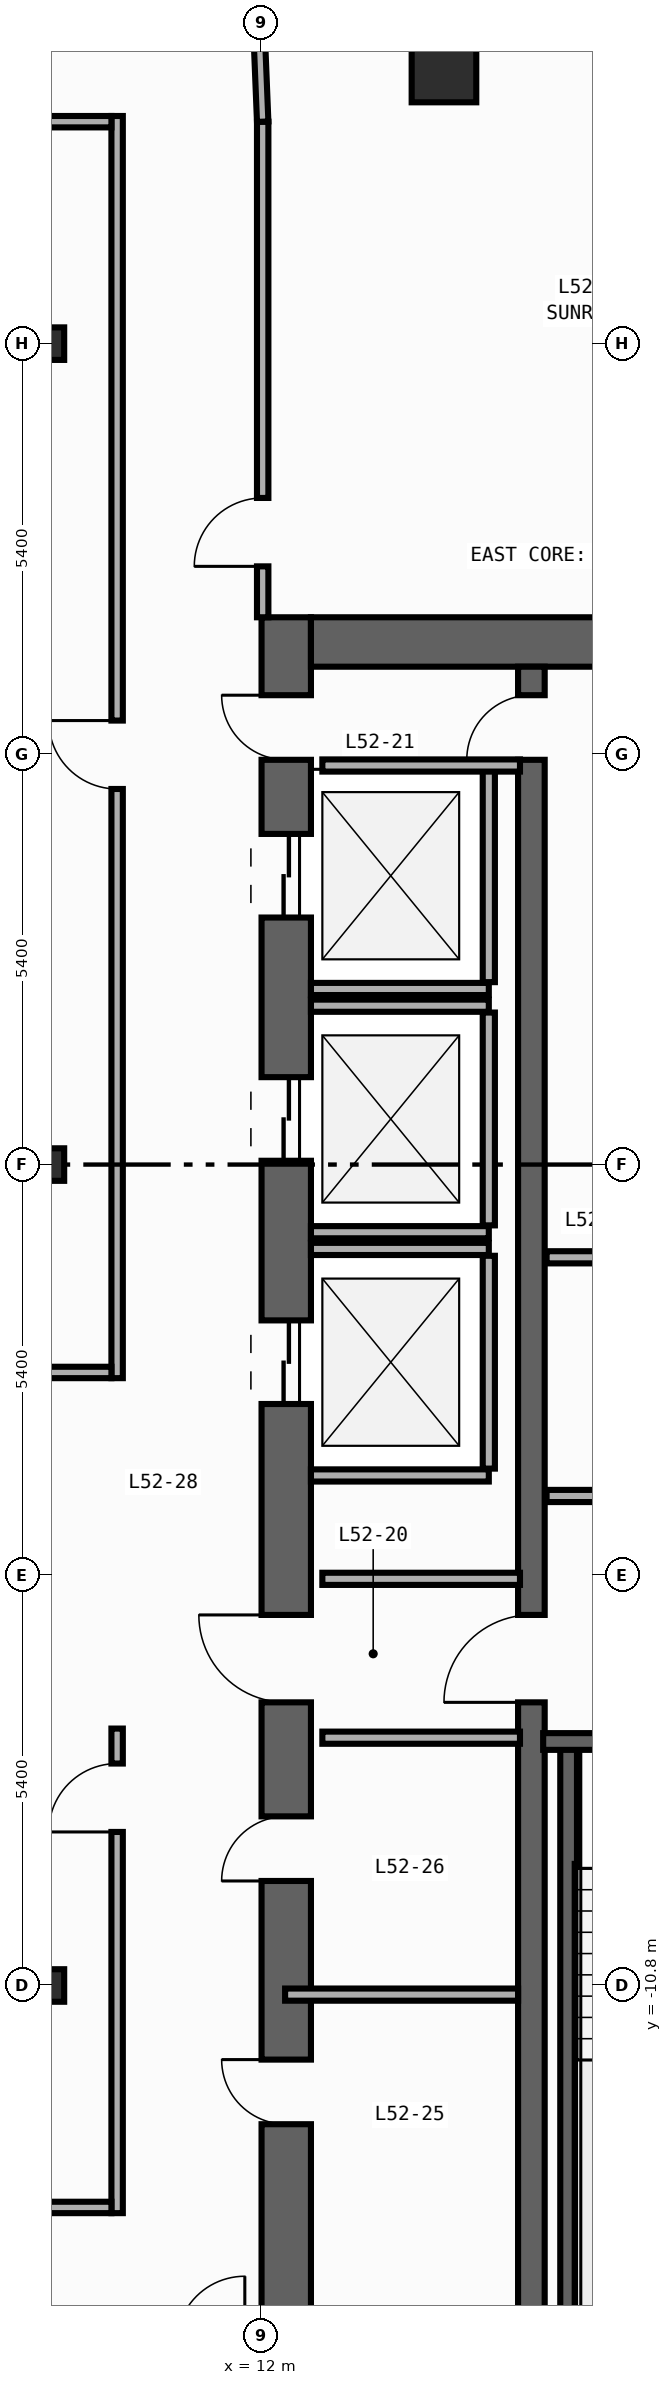
"""IFC4 building model, lengths in metres.
Left out: names, types, materials, properties, quantities, classifications, styles, units other than length and angle.
Written with IfcOpenShell. Run it as: python <this file> out.ifc"""

import sys

from ifc_helpers import new_model, si_unit, direction, frame, frame_2d, origin, origin_2d, place, context, subcontext, project, spatial, rectangle, i_section, extrude, element, fill, save


model = new_model("IFC4")
c1 = context("Model", 3, precision=1e-05, world=origin(), true_north=direction((0.0, 1.0)))
c2 = subcontext(c1, "Body", "Model", "MODEL_VIEW")
j1 = project(units=[si_unit("LENGTHUNIT", "METRE"), si_unit("PLANEANGLEUNIT", "RADIAN")], contexts=[c1])
p1 = place(None, origin())
s1 = spatial("IfcSite", under=j1, at=p1, CompositionType="ELEMENT")
p2 = place(p1, origin())
s2 = spatial("IfcBuilding", under=s1, at=p2, CompositionType="ELEMENT")
p3 = place(p2, frame((0.0, 0.0, 226.0)))
s3 = spatial("IfcBuildingStorey", under=s2, at=p3, CompositionType="ELEMENT", Elevation=226.0)
p4 = place(p3, frame((12.325, -19.8, 0.0), z_axis=(0.0, 0.0, 1.0), x_axis=(0.0, 1.0, 0.0)))
e1 = element("IfcWall", 1, at=p4, inside=s3, PredefinedType="SHEAR", context=c2, shape_type="SweptSolid", body=[
    extrude(rectangle(XDim=27.0, YDim=0.65, at=frame_2d((13.5, 0.0))), origin(), (0.0, 0.0, 1.0), 3.34),
])
p5 = place(p4, frame((23.05, 0.0, 0.0)))
e2 = element("IfcOpeningElement", 2, at=p5, cuts=e1, PredefinedType="OPENING", context=c2, shape_type="SweptSolid", body=[
    extrude(rectangle(XDim=1.1, YDim=2.2, at=frame_2d((0.55, 1.1))), frame((0.0, 0.335, 0.0), z_axis=(0.0, -1.0, 0.0), x_axis=(1.0, 0.0, 0.0)), (0.0, 0.0, 1.0), 0.67),
])
p6 = place(p4, frame((19.85, 0.0, 0.0)))
e3 = element("IfcOpeningElement", 3, at=p6, cuts=e1, PredefinedType="OPENING", context=c2, shape_type="SweptSolid", body=[
    extrude(rectangle(XDim=1.1, YDim=2.2, at=frame_2d((0.55, 1.1))), frame((0.0, 0.335, 0.0), z_axis=(0.0, -1.0, 0.0), x_axis=(1.0, 0.0, 0.0)), (0.0, 0.0, 1.0), 0.67),
])
p7 = place(p4, frame((16.65, 0.0, 0.0)))
e4 = element("IfcOpeningElement", 4, at=p7, cuts=e1, PredefinedType="OPENING", context=c2, shape_type="SweptSolid", body=[
    extrude(rectangle(XDim=1.1, YDim=2.2, at=frame_2d((0.55, 1.1))), frame((0.0, 0.335, 0.0), z_axis=(0.0, -1.0, 0.0), x_axis=(1.0, 0.0, 0.0)), (0.0, 0.0, 1.0), 0.67),
])
p8 = place(p4, frame((7.175, 0.0, 0.0)))
e5 = element("IfcOpeningElement", 5, at=p8, cuts=e1, PredefinedType="OPENING", context=c2, shape_type="SweptSolid", body=[
    extrude(rectangle(XDim=0.85, YDim=2.1, at=frame_2d((0.425, 1.05))), frame((0.0, 0.335, 0.0), z_axis=(0.0, -1.0, 0.0), x_axis=(1.0, 0.0, 0.0)), (0.0, 0.0, 1.0), 0.67),
])
p9 = place(p4, frame((10.375, 0.0, 0.0)))
e6 = element("IfcOpeningElement", 6, at=p9, cuts=e1, PredefinedType="OPENING", context=c2, shape_type="SweptSolid", body=[
    extrude(rectangle(XDim=0.85, YDim=2.1, at=frame_2d((0.425, 1.05))), frame((0.0, 0.335, 0.0), z_axis=(0.0, -1.0, 0.0), x_axis=(1.0, 0.0, 0.0)), (0.0, 0.0, 1.0), 0.67),
])
p10 = place(p4, frame((12.725, 0.0, 0.0)))
e7 = element("IfcOpeningElement", 7, at=p10, cuts=e1, PredefinedType="OPENING", context=c2, shape_type="SweptSolid", body=[
    extrude(rectangle(XDim=1.15, YDim=2.2, at=frame_2d((0.575, 1.1))), frame((0.0, 0.335, 0.0), z_axis=(0.0, -1.0, 0.0), x_axis=(1.0, 0.0, 0.0)), (0.0, 0.0, 1.0), 0.67),
])
p11 = place(p4, frame((25.125, 0.0, 0.0)))
e8 = element("IfcOpeningElement", 8, at=p11, cuts=e1, PredefinedType="OPENING", context=c2, shape_type="SweptSolid", body=[
    extrude(rectangle(XDim=0.85, YDim=2.1, at=frame_2d((0.425, 1.05))), frame((0.0, 0.335, 0.0), z_axis=(0.0, -1.0, 0.0), x_axis=(1.0, 0.0, 0.0)), (0.0, 0.0, 1.0), 0.67),
])
p12 = place(p3, frame((12.65, 6.875, 0.0), z_axis=(0.0, 0.0, 1.0), x_axis=(1.0, 0.0, 0.0)))
e9 = element("IfcWall", 9, at=p12, inside=s3, PredefinedType="SHEAR", context=c2, shape_type="SweptSolid", body=[
    extrude(rectangle(XDim=7.1, YDim=0.65, at=frame_2d((3.55, 0.0))), origin(), (0.0, 0.0, 1.0), 3.34),
])
p13 = place(p3, frame((15.55, -19.15, 0.0), z_axis=(0.0, 0.0, 1.0), x_axis=(0.0, 1.0, 0.0)))
e10 = element("IfcWall", 10, at=p13, inside=s3, PredefinedType="SHEAR", context=c2, shape_type="SweptSolid", body=[
    extrude(rectangle(XDim=25.7, YDim=0.35, at=frame_2d((12.85, 0.0))), origin(), (0.0, 0.0, 1.0), 3.34),
])
p14 = place(p13, frame((12.075, 0.0, 0.0)))
e11 = element("IfcOpeningElement", 11, at=p14, cuts=e10, PredefinedType="OPENING", context=c2, shape_type="SweptSolid", body=[
    extrude(rectangle(XDim=1.15, YDim=2.2, at=frame_2d((0.575, 1.1))), frame((0.0, 0.185, 0.0), z_axis=(0.0, -1.0, 0.0), x_axis=(1.0, 0.0, 0.0)), (0.0, 0.0, 1.0), 0.37),
])
p15 = place(p13, frame((24.475, 0.0, 0.0)))
e12 = element("IfcOpeningElement", 12, at=p15, cuts=e10, PredefinedType="OPENING", context=c2, shape_type="SweptSolid", body=[
    extrude(rectangle(XDim=0.85, YDim=2.1, at=frame_2d((0.425, 1.05))), frame((0.0, 0.185, 0.0), z_axis=(0.0, -1.0, 0.0), x_axis=(1.0, 0.0, 0.0)), (0.0, 0.0, 1.0), 0.37),
])
p16 = place(p3, frame((16.04, -19.01, 0.0), z_axis=(0.0, 0.0, 1.0), x_axis=(0.0, 1.0, 0.0)))
e13 = element("IfcWall", 13, at=p16, inside=s3, PredefinedType="SHEAR", context=c2, shape_type="SweptSolid", body=[
    extrude(rectangle(XDim=11.42, YDim=0.22, at=frame_2d((5.71, 0.0))), origin(), (0.0, 0.0, 1.0), 3.34),
])
p17 = place(p3, frame((19.77, -7.59, 0.0), z_axis=(0.0, 0.0, 1.0), x_axis=(-1.0, 0.0, 0.0)))
e14 = element("IfcWall", 14, at=p17, inside=s3, PredefinedType="SHEAR", context=c2, shape_type="SweptSolid", body=[
    extrude(rectangle(XDim=4.065, YDim=0.22, at=frame_2d((2.032, 0.0))), origin(), (0.0, 0.0, 1.0), 3.34),
])
p18 = place(p17, frame((1.08, 0.0, 0.0)))
e15 = element("IfcOpeningElement", 15, at=p18, cuts=e14, PredefinedType="OPENING", context=c2, shape_type="SweptSolid", body=[
    extrude(rectangle(XDim=1.1, YDim=2.2, at=frame_2d((0.55, 1.1))), frame((0.0, 0.12, 0.0), z_axis=(0.0, -1.0, 0.0), x_axis=(1.0, 0.0, 0.0)), (0.0, 0.0, 1.0), 0.24),
])
for number, where, z_axis, x_axis in (
    (16, (9.2, -10.8, 0.0), (0.0, 0.0, 1.0), (1.0, 0.0, 0.0)),
    (17, (9.2, 0.0, 0.0), (0.0, 0.0, 1.0), (1.0, 0.0, 0.0)),
    (18, (9.2, 10.8, 0.0), (0.0, 0.0, 1.0), (1.0, 0.0, 0.0)),
):
    element("IfcColumn", number, at=place(p3, frame(where, z_axis=z_axis, x_axis=x_axis)), inside=s3, PredefinedType="COLUMN", context=c2, shape_type="SweptSolid", body=[
        extrude(i_section(OverallWidth=0.407, OverallDepth=0.428, WebThickness=0.02, FlangeThickness=0.035, FilletRadius=0.022, at=origin_2d()), origin(), (0.0, 0.0, 1.0), 3.6),
    ])
p19 = place(p3, frame((14.4, 14.4, 0.0), z_axis=(0.0, 0.0, 1.0), x_axis=(1.0, 0.0, 0.0)))
e19 = element("IfcColumn", 19, at=p19, inside=s3, PredefinedType="COLUMN", context=c2, shape_type="SweptSolid", body=[
    extrude(rectangle(XDim=0.85, YDim=0.85, at=origin_2d()), origin(), (0.0, 0.0, 1.0), 3.6),
])
p20 = place(p3, frame((12.65, 2.31, 0.0), z_axis=(0.0, 0.0, 1.0), x_axis=(1.0, 0.0, 0.0)))
e20 = element("IfcWall", 20, at=p20, inside=s3, PredefinedType="STANDARD", context=c2, shape_type="SweptSolid", body=[
    extrude(rectangle(XDim=2.34, YDim=0.16, at=frame_2d((1.17, 0.0))), origin(), (0.0, 0.0, 1.0), 3.34),
])
p21 = place(p3, frame((14.99, 2.4, 0.0), z_axis=(0.0, 0.0, 1.0), x_axis=(0.0, 1.0, 0.0)))
e21 = element("IfcWall", 21, at=p21, inside=s3, PredefinedType="STANDARD", context=c2, shape_type="SweptSolid", body=[
    extrude(rectangle(XDim=2.8, YDim=0.16, at=frame_2d((1.4, 0.0))), origin(), (0.0, 0.0, 1.0), 3.34),
])
for number, where, z_axis, x_axis in (
    (22, (12.65, -0.89, 0.0), (0.0, 0.0, 1.0), (1.0, 0.0, 0.0)),
    (23, (12.65, 2.09, 0.0), (0.0, 0.0, 1.0), (1.0, 0.0, 0.0)),
):
    element("IfcWall", number, at=place(p3, frame(where, z_axis=z_axis, x_axis=x_axis)), inside=s3, PredefinedType="STANDARD", context=c2, shape_type="SweptSolid", body=[
        extrude(rectangle(XDim=2.34, YDim=0.16, at=frame_2d((1.17, 0.0))), origin(), (0.0, 0.0, 1.0), 3.34),
    ])
p22 = place(p3, frame((14.99, -0.8, 0.0), z_axis=(0.0, 0.0, 1.0), x_axis=(0.0, 1.0, 0.0)))
e24 = element("IfcWall", 24, at=p22, inside=s3, PredefinedType="STANDARD", context=c2, shape_type="SweptSolid", body=[
    extrude(rectangle(XDim=2.8, YDim=0.16, at=frame_2d((1.4, 0.0))), origin(), (0.0, 0.0, 1.0), 3.34),
])
for number, where, z_axis, x_axis in (
    (25, (12.65, -4.09, 0.0), (0.0, 0.0, 1.0), (1.0, 0.0, 0.0)),
    (26, (12.65, -1.11, 0.0), (0.0, 0.0, 1.0), (1.0, 0.0, 0.0)),
):
    element("IfcWall", number, at=place(p3, frame(where, z_axis=z_axis, x_axis=x_axis)), inside=s3, PredefinedType="STANDARD", context=c2, shape_type="SweptSolid", body=[
        extrude(rectangle(XDim=2.34, YDim=0.16, at=frame_2d((1.17, 0.0))), origin(), (0.0, 0.0, 1.0), 3.34),
    ])
p23 = place(p3, frame((14.99, -4.0, 0.0), z_axis=(0.0, 0.0, 1.0), x_axis=(0.0, 1.0, 0.0)))
e27 = element("IfcWall", 27, at=p23, inside=s3, PredefinedType="STANDARD", context=c2, shape_type="SweptSolid", body=[
    extrude(rectangle(XDim=2.8, YDim=0.16, at=frame_2d((1.4, 0.0))), origin(), (0.0, 0.0, 1.0), 3.34),
])
p24 = place(p3, frame((15.75, -4.36, 0.0), z_axis=(0.0, 0.0, 1.0), x_axis=(1.0, 0.0, 0.0)))
e28 = element("IfcWall", 28, at=p24, inside=s3, PredefinedType="STANDARD", context=c2, shape_type="SweptSolid", body=[
    extrude(rectangle(XDim=3.8, YDim=0.16, at=frame_2d((1.9, 0.0))), origin(), (0.0, 0.0, 1.0), 3.34),
])
p25 = place(p24, frame((1.47, 0.0, 0.0)))
e29 = element("IfcOpeningElement", 29, at=p25, cuts=e28, PredefinedType="OPENING", context=c2, shape_type="SweptSolid", body=[
    extrude(rectangle(XDim=1.15, YDim=2.2, at=frame_2d((0.575, 1.1))), frame((0.0, 0.09, 0.0), z_axis=(0.0, -1.0, 0.0), x_axis=(1.0, 0.0, 0.0)), (0.0, 0.0, 1.0), 0.18),
])
p26 = place(p3, frame((15.75, -1.22, 0.0), z_axis=(0.0, 0.0, 1.0), x_axis=(1.0, 0.0, 0.0)))
e30 = element("IfcWall", 30, at=p26, inside=s3, PredefinedType="STANDARD", context=c2, shape_type="SweptSolid", body=[
    extrude(rectangle(XDim=3.8, YDim=0.16, at=frame_2d((1.9, 0.0))), origin(), (0.0, 0.0, 1.0), 3.34),
])
for number, where, z_axis, x_axis in (
    (31, (12.8, -5.45, 0.0), (0.0, 0.0, 1.0), (1.0, 0.0, 0.0)),
    (32, (12.8, -7.54, 0.0), (0.0, 0.0, 1.0), (1.0, 0.0, 0.0)),
    (33, (12.8, 5.25, 0.0), (0.0, 0.0, 1.0), (1.0, 0.0, 0.0)),
):
    element("IfcWall", number, at=place(p3, frame(where, z_axis=z_axis, x_axis=x_axis)), inside=s3, PredefinedType="STANDARD", context=c2, shape_type="SweptSolid", body=[
        extrude(rectangle(XDim=2.6, YDim=0.16, at=frame_2d((1.3, 0.0))), origin(), (0.0, 0.0, 1.0), 3.34),
    ])
p27 = place(p3, frame((12.31, -10.92, 0.0), z_axis=(0.0, 0.0, 1.0), x_axis=(1.0, 0.0, 0.0)))
e34 = element("IfcWall", 34, at=p27, inside=s3, PredefinedType="PARTITIONING", context=c2, shape_type="SweptSolid", body=[
    extrude(rectangle(XDim=3.065, YDim=0.16, at=frame_2d((1.532, 0.0))), origin(), (0.0, 0.0, 1.0), 2.44),
])
p28 = place(p3, frame((12.015, 7.2, 0.0), z_axis=(0.0, 0.0, 1.0), x_axis=(0.0, 1.0, 0.0)))
e35 = element("IfcWall", 35, at=p28, inside=s3, PredefinedType="PARTITIONING", context=c2, shape_type="SweptSolid", body=[
    extrude(rectangle(XDim=6.52, YDim=0.15, at=frame_2d((3.26, 0.0))), origin(), (0.0, 0.0, 1.0), 3.34),
])
p29 = place(p28, frame((0.67, 0.0, 0.0)))
e36 = element("IfcOpeningElement", 36, at=p29, cuts=e35, PredefinedType="OPENING", context=c2, shape_type="SweptSolid", body=[
    extrude(rectangle(XDim=0.9, YDim=2.15, at=frame_2d((0.45, 1.075))), frame((0.0, 0.085, 0.0), z_axis=(0.0, -1.0, 0.0), x_axis=(1.0, 0.0, 0.0)), (0.0, 0.0, 1.0), 0.17),
])
p30 = place(p3, frame((10.1, -2.81, 0.0), z_axis=(0.0, 0.0, 1.0), x_axis=(0.0, 1.0, 0.0)))
e37 = element("IfcWall", 37, at=p30, inside=s3, PredefinedType="PARTITIONING", context=c2, shape_type="SweptSolid", body=[
    extrude(rectangle(XDim=16.605, YDim=0.15, at=frame_2d((8.302, 0.0))), origin(), (0.0, 0.0, 1.0), 3.34),
])
p31 = place(p30, frame((7.751, 0.0, 0.0)))
e38 = element("IfcOpeningElement", 38, at=p31, cuts=e37, PredefinedType="OPENING", context=c2, shape_type="SweptSolid", body=[
    extrude(rectangle(XDim=0.9, YDim=2.15, at=frame_2d((0.45, 1.075))), frame((0.0, 0.085, 0.0), z_axis=(0.0, -1.0, 0.0), x_axis=(1.0, 0.0, 0.0)), (0.0, 0.0, 1.0), 0.17),
])
p32 = place(p3, frame((10.1, -13.795, 0.0), z_axis=(0.0, 0.0, 1.0), x_axis=(0.0, 1.0, 0.0)))
e39 = element("IfcWall", 39, at=p32, inside=s3, PredefinedType="PARTITIONING", context=c2, shape_type="SweptSolid", body=[
    extrude(rectangle(XDim=6.375, YDim=0.15, at=frame_2d((3.188, 0.0))), origin(), (0.0, 0.0, 1.0), 3.34),
])
p33 = place(p32, frame((5.015, 0.0, 0.0)))
e40 = element("IfcOpeningElement", 40, at=p33, cuts=e39, PredefinedType="OPENING", context=c2, shape_type="SweptSolid", body=[
    extrude(rectangle(XDim=0.9, YDim=2.15, at=frame_2d((0.45, 1.075))), frame((0.0, 0.085, 0.0), z_axis=(0.0, -1.0, 0.0), x_axis=(1.0, 0.0, 0.0)), (0.0, 0.0, 1.0), 0.17),
])
p34 = place(p3, frame((-3.01, -2.735, 0.0), z_axis=(0.0, 0.0, 1.0), x_axis=(1.0, 0.0, 0.0)))
e41 = element("IfcWall", 41, at=p34, inside=s3, PredefinedType="PARTITIONING", context=c2, shape_type="SweptSolid", body=[
    extrude(rectangle(XDim=13.035, YDim=0.15, at=frame_2d((6.518, 0.0))), origin(), (0.0, 0.0, 1.0), 3.34),
])
p35 = place(p34, frame((2.463, 0.0, 0.0)))
e42 = element("IfcOpeningElement", 42, at=p35, cuts=e41, PredefinedType="OPENING", context=c2, shape_type="SweptSolid", body=[
    extrude(rectangle(XDim=0.9, YDim=2.15, at=frame_2d((0.45, 1.075))), frame((0.0, 0.085, 0.0), z_axis=(0.0, -1.0, 0.0), x_axis=(1.0, 0.0, 0.0)), (0.0, 0.0, 1.0), 0.17),
])
p36 = place(p3, frame((12.015, 13.72, 0.0), z_axis=(0.0, 0.0, 1.0), x_axis=(-0.040046877756, 0.99919780203, 0.0)))
e43 = element("IfcWall", 43, at=p36, inside=s3, PredefinedType="PARTITIONING", context=c2, shape_type="SweptSolid", body=[
    extrude(rectangle(XDim=1.731, YDim=0.15, at=frame_2d((0.866, 0.0))), origin(), (0.0, 0.0, 1.0), 3.34),
])
p37 = place(p3, frame((-2.86, 13.72, 0.0), z_axis=(0.0, 0.0, 1.0), x_axis=(1.0, 0.0, 0.0)))
e44 = element("IfcWall", 44, at=p37, inside=s3, PredefinedType="PARTITIONING", context=c2, shape_type="SweptSolid", body=[
    extrude(rectangle(XDim=12.885, YDim=0.15, at=frame_2d((6.442, 0.0))), origin(), (0.0, 0.0, 1.0), 3.34),
])
p38 = place(p37, frame((4.685, 0.0, 0.0)))
e45 = element("IfcOpeningElement", 45, at=p38, cuts=e44, PredefinedType="OPENING", context=c2, shape_type="SweptSolid", body=[
    extrude(rectangle(XDim=0.9, YDim=2.15, at=frame_2d((0.45, 1.075))), frame((0.0, 0.085, 0.0), z_axis=(0.0, -1.0, 0.0), x_axis=(1.0, 0.0, 0.0)), (0.0, 0.0, 1.0), 0.17),
])
p39 = place(p3, frame((-3.03, -13.72, 0.0), z_axis=(0.0, 0.0, 1.0), x_axis=(1.0, 0.0, 0.0)))
e46 = element("IfcWall", 46, at=p39, inside=s3, PredefinedType="PARTITIONING", context=c2, shape_type="SweptSolid", body=[
    extrude(rectangle(XDim=13.055, YDim=0.15, at=frame_2d((6.527, 0.0))), origin(), (0.0, 0.0, 1.0), 3.34),
])
p40 = place(p39, frame((4.874, 0.0, 0.0)))
e47 = element("IfcOpeningElement", 47, at=p40, cuts=e46, PredefinedType="OPENING", context=c2, shape_type="SweptSolid", body=[
    extrude(rectangle(XDim=0.9, YDim=2.15, at=frame_2d((0.45, 1.075))), frame((0.0, 0.085, 0.0), z_axis=(0.0, -1.0, 0.0), x_axis=(1.0, 0.0, 0.0)), (0.0, 0.0, 1.0), 0.17),
])
p41 = place(p5, origin())
e48 = element("IfcDoor", 48, at=p41, inside=s3, OperationType="DOUBLE_DOOR_SLIDING", PredefinedType="DOOR", context=c2, shape_type="SweptSolid", body=[
    extrude(rectangle(XDim=1.1, YDim=2.2, at=frame_2d((0.55, 1.1))), frame((0.0, 0.025, 0.0), z_axis=(0.0, -1.0, 0.0), x_axis=(1.0, 0.0, 0.0)), (0.0, 0.0, 1.0), 0.05),
])
fill(e2, e48)
p42 = place(p6, origin())
e49 = element("IfcDoor", 49, at=p42, inside=s3, OperationType="DOUBLE_DOOR_SLIDING", PredefinedType="DOOR", context=c2, shape_type="SweptSolid", body=[
    extrude(rectangle(XDim=1.1, YDim=2.2, at=frame_2d((0.55, 1.1))), frame((0.0, 0.025, 0.0), z_axis=(0.0, -1.0, 0.0), x_axis=(1.0, 0.0, 0.0)), (0.0, 0.0, 1.0), 0.05),
])
fill(e3, e49)
p43 = place(p7, origin())
e50 = element("IfcDoor", 50, at=p43, inside=s3, OperationType="DOUBLE_DOOR_SLIDING", PredefinedType="DOOR", context=c2, shape_type="SweptSolid", body=[
    extrude(rectangle(XDim=1.1, YDim=2.2, at=frame_2d((0.55, 1.1))), frame((0.0, 0.025, 0.0), z_axis=(0.0, -1.0, 0.0), x_axis=(1.0, 0.0, 0.0)), (0.0, 0.0, 1.0), 0.05),
])
fill(e4, e50)
p44 = place(p8, origin())
e51 = element("IfcDoor", 51, at=p44, inside=s3, OperationType="SINGLE_SWING_RIGHT", PredefinedType="DOOR", context=c2, shape_type="SweptSolid", body=[
    extrude(rectangle(XDim=0.85, YDim=2.1, at=frame_2d((0.425, 1.05))), frame((0.0, 0.025, 0.0), z_axis=(0.0, -1.0, 0.0), x_axis=(1.0, 0.0, 0.0)), (0.0, 0.0, 1.0), 0.05),
])
fill(e5, e51)
p45 = place(p9, origin())
e52 = element("IfcDoor", 52, at=p45, inside=s3, OperationType="SINGLE_SWING_LEFT", PredefinedType="DOOR", context=c2, shape_type="SweptSolid", body=[
    extrude(rectangle(XDim=0.85, YDim=2.1, at=frame_2d((0.425, 1.05))), frame((0.0, 0.025, 0.0), z_axis=(0.0, -1.0, 0.0), x_axis=(1.0, 0.0, 0.0)), (0.0, 0.0, 1.0), 0.05),
])
fill(e6, e52)
p46 = place(p10, origin())
e53 = element("IfcDoor", 53, at=p46, inside=s3, OperationType="SINGLE_SWING_RIGHT", PredefinedType="DOOR", context=c2, shape_type="SweptSolid", body=[
    extrude(rectangle(XDim=1.15, YDim=2.2, at=frame_2d((0.575, 1.1))), frame((0.0, 0.025, 0.0), z_axis=(0.0, -1.0, 0.0), x_axis=(1.0, 0.0, 0.0)), (0.0, 0.0, 1.0), 0.05),
])
fill(e7, e53)
p47 = place(p14, origin())
e54 = element("IfcDoor", 54, at=p47, inside=s3, OperationType="SINGLE_SWING_LEFT", PredefinedType="DOOR", context=c2, shape_type="SweptSolid", body=[
    extrude(rectangle(XDim=1.15, YDim=2.2, at=frame_2d((0.575, 1.1))), frame((0.0, 0.025, 0.0), z_axis=(0.0, -1.0, 0.0), x_axis=(1.0, 0.0, 0.0)), (0.0, 0.0, 1.0), 0.05),
])
fill(e11, e54)
p48 = place(p11, origin())
e55 = element("IfcDoor", 55, at=p48, inside=s3, OperationType="SINGLE_SWING_RIGHT", PredefinedType="DOOR", context=c2, shape_type="SweptSolid", body=[
    extrude(rectangle(XDim=0.85, YDim=2.1, at=frame_2d((0.425, 1.05))), frame((0.0, 0.025, 0.0), z_axis=(0.0, -1.0, 0.0), x_axis=(1.0, 0.0, 0.0)), (0.0, 0.0, 1.0), 0.05),
])
fill(e8, e55)
p49 = place(p15, origin())
e56 = element("IfcDoor", 56, at=p49, inside=s3, OperationType="SINGLE_SWING_LEFT", PredefinedType="DOOR", context=c2, shape_type="SweptSolid", body=[
    extrude(rectangle(XDim=0.85, YDim=2.1, at=frame_2d((0.425, 1.05))), frame((0.0, 0.025, 0.0), z_axis=(0.0, -1.0, 0.0), x_axis=(1.0, 0.0, 0.0)), (0.0, 0.0, 1.0), 0.05),
])
fill(e12, e56)
p50 = place(p29, origin())
e57 = element("IfcDoor", 57, at=p50, inside=s3, OperationType="SINGLE_SWING_LEFT", PredefinedType="DOOR", context=c2, shape_type="SweptSolid", body=[
    extrude(rectangle(XDim=0.9, YDim=2.15, at=frame_2d((0.45, 1.075))), frame((0.0, 0.025, 0.0), z_axis=(0.0, -1.0, 0.0), x_axis=(1.0, 0.0, 0.0)), (0.0, 0.0, 1.0), 0.05),
])
fill(e36, e57)
p51 = place(p31, origin())
e58 = element("IfcDoor", 58, at=p51, inside=s3, OperationType="SINGLE_SWING_RIGHT", PredefinedType="DOOR", context=c2, shape_type="SweptSolid", body=[
    extrude(rectangle(XDim=0.9, YDim=2.15, at=frame_2d((0.45, 1.075))), frame((0.0, 0.025, 0.0), z_axis=(0.0, -1.0, 0.0), x_axis=(1.0, 0.0, 0.0)), (0.0, 0.0, 1.0), 0.05),
])
fill(e38, e58)
p52 = place(p33, origin())
e59 = element("IfcDoor", 59, at=p52, inside=s3, OperationType="SINGLE_SWING_LEFT", PredefinedType="DOOR", context=c2, shape_type="SweptSolid", body=[
    extrude(rectangle(XDim=0.9, YDim=2.15, at=frame_2d((0.45, 1.075))), frame((0.0, 0.025, 0.0), z_axis=(0.0, -1.0, 0.0), x_axis=(1.0, 0.0, 0.0)), (0.0, 0.0, 1.0), 0.05),
])
fill(e40, e59)
save(model, sys.argv[1])
